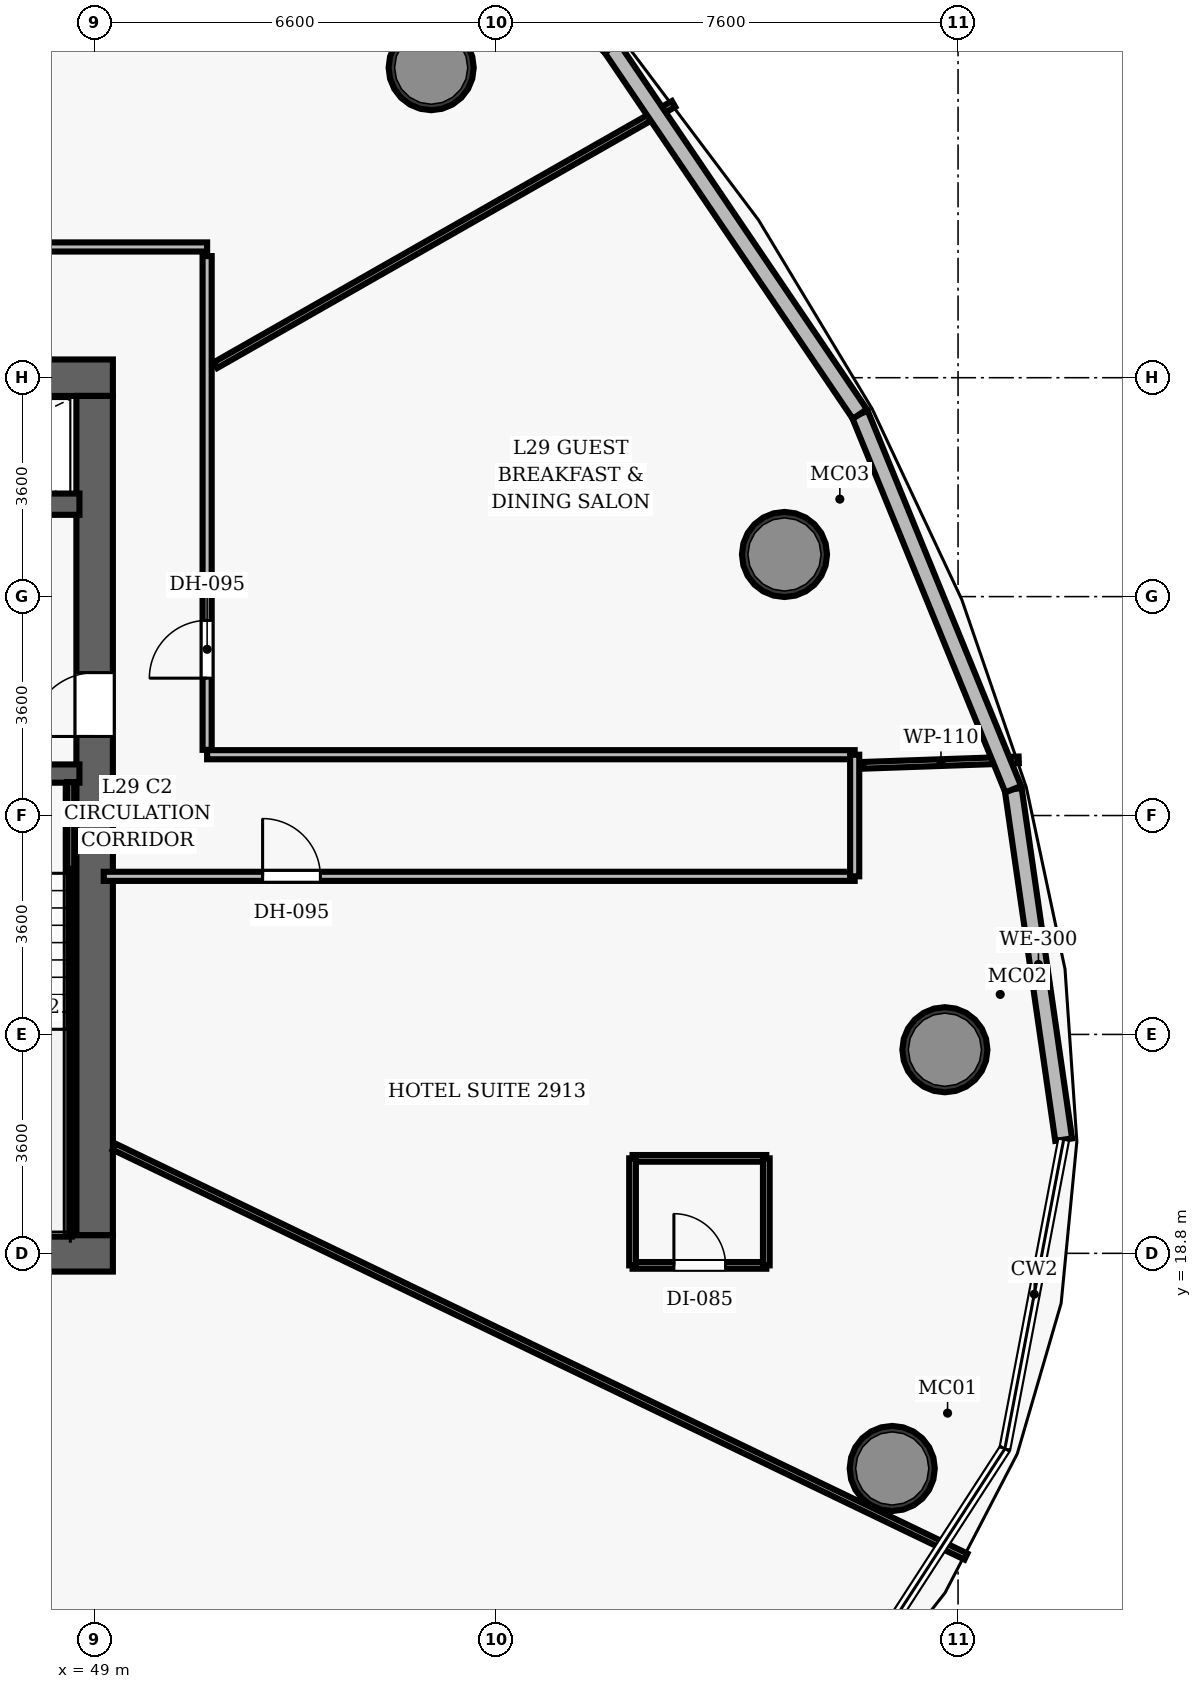
"""IFC4 building model, lengths in metres.
Left out: names, types, materials, properties, quantities, classifications, styles, units other than length and angle.
Written with IfcOpenShell. Run it as: python <this file> out.ifc"""

import sys

from ifc_helpers import new_model, si_unit, direction, frame, frame_2d, origin, origin_2d, place, context, subcontext, project, spatial, rectangle, hollow_circle, extrude, element, fill, save


model = new_model("IFC4")
c1 = context("Model", 3, precision=1e-05, world=origin(), true_north=direction((0.0, 1.0)))
c2 = subcontext(c1, "Body", "Model", "MODEL_VIEW")
j1 = project(units=[si_unit("LENGTHUNIT", "METRE"), si_unit("PLANEANGLEUNIT", "RADIAN")], contexts=[c1])
p1 = place(None, origin())
s1 = spatial("IfcSite", under=j1, at=p1, CompositionType="ELEMENT")
p2 = place(p1, origin())
s2 = spatial("IfcBuilding", under=s1, at=p2, CompositionType="ELEMENT")
p3 = place(p2, frame((0.0, 0.0, 120.3)))
s3 = spatial("IfcBuildingStorey", under=s2, at=p3, CompositionType="ELEMENT", Elevation=120.3)
p4 = place(p3, frame((26.7, 18.8, 0.0), z_axis=(0.0, 0.0, 1.0), x_axis=(1.0, 0.0, 0.0)))
e1 = element("IfcWall", 1, at=p4, inside=s3, PredefinedType="SHEAR", context=c2, shape_type="SweptSolid", body=[
    extrude(rectangle(XDim=22.6, YDim=0.6, at=frame_2d((11.3, 0.0))), origin(), (0.0, 0.0, 1.0), 3.5),
])
p5 = place(p4, frame((14.52, 0.0, 0.0)))
e2 = element("IfcOpeningElement", 2, at=p5, cuts=e1, PredefinedType="OPENING", context=c2, shape_type="SweptSolid", body=[
    extrude(rectangle(XDim=1.05, YDim=2.15, at=frame_2d((0.525, 1.075))), frame((0.0, 0.31, 0.0), z_axis=(0.0, -1.0, 0.0), x_axis=(1.0, 0.0, 0.0)), (0.0, 0.0, 1.0), 0.62),
])
p6 = place(p3, frame((26.7, 33.2, 0.0), z_axis=(0.0, 0.0, 1.0), x_axis=(1.0, 0.0, 0.0)))
e3 = element("IfcWall", 3, at=p6, inside=s3, PredefinedType="SHEAR", context=c2, shape_type="SweptSolid", body=[
    extrude(rectangle(XDim=22.6, YDim=0.6, at=frame_2d((11.3, 0.0))), origin(), (0.0, 0.0, 1.0), 3.5),
])
p7 = place(p6, frame((4.62, 0.0, 0.0)))
e4 = element("IfcOpeningElement", 4, at=p7, cuts=e3, PredefinedType="OPENING", context=c2, shape_type="SweptSolid", body=[
    extrude(rectangle(XDim=1.05, YDim=2.15, at=frame_2d((0.525, 1.075))), frame((0.0, 0.31, 0.0), z_axis=(0.0, -1.0, 0.0), x_axis=(1.0, 0.0, 0.0)), (0.0, 0.0, 1.0), 0.62),
])
p8 = place(p6, frame((14.52, 0.0, 0.0)))
e5 = element("IfcOpeningElement", 5, at=p8, cuts=e3, PredefinedType="OPENING", context=c2, shape_type="SweptSolid", body=[
    extrude(rectangle(XDim=1.05, YDim=2.15, at=frame_2d((0.525, 1.075))), frame((0.0, 0.31, 0.0), z_axis=(0.0, -1.0, 0.0), x_axis=(1.0, 0.0, 0.0)), (0.0, 0.0, 1.0), 0.62),
])
p9 = place(p3, frame((49.0, 19.1, 0.0), z_axis=(0.0, 0.0, 1.0), x_axis=(0.0, 1.0, 0.0)))
e6 = element("IfcWall", 6, at=p9, inside=s3, PredefinedType="SHEAR", context=c2, shape_type="SweptSolid", body=[
    extrude(rectangle(XDim=13.8, YDim=0.6, at=frame_2d((6.9, 0.0))), origin(), (0.0, 0.0, 1.0), 3.5),
])
p10 = place(p9, frame((8.2, 0.0, 0.0)))
e7 = element("IfcOpeningElement", 7, at=p10, cuts=e6, PredefinedType="OPENING", context=c2, shape_type="SweptSolid", body=[
    extrude(rectangle(XDim=1.05, YDim=2.15, at=frame_2d((0.525, 1.075))), frame((0.0, 0.31, 0.0), z_axis=(0.0, -1.0, 0.0), x_axis=(1.0, 0.0, 0.0)), (0.0, 0.0, 1.0), 0.62),
])
for number, where, z_axis, x_axis in (
    (8, (62.118, 15.262, 0.0), (0.0, 0.0, 1.0), (1.0, 0.0, 0.0)),
    (9, (62.984, 22.148, 0.0), (0.0, 0.0, 1.0), (1.0, 0.0, 0.0)),
    (10, (60.346, 30.293, 0.0), (0.0, 0.0, 1.0), (1.0, 0.0, 0.0)),
    (11, (54.535, 38.299, 0.0), (0.0, 0.0, 1.0), (1.0, 0.0, 0.0)),
):
    element("IfcColumn", number, at=place(p3, frame(where, z_axis=z_axis, x_axis=x_axis)), inside=s3, PredefinedType="COLUMN", context=c2, shape_type="SweptSolid", body=[
        extrude(hollow_circle(Radius=0.7, WallThickness=0.055, at=origin_2d()), origin(), (0.0, 0.0, 1.0), 3.5),
    ])
p11 = place(p3, frame((45.08, 26.69, 0.0), z_axis=(0.0, 0.0, 1.0), x_axis=(1.0, 0.0, 0.0)))
e12 = element("IfcWall", 12, at=p11, inside=s3, PredefinedType="SHEAR", context=c2, shape_type="SweptSolid", body=[
    extrude(rectangle(XDim=3.67, YDim=0.3, at=frame_2d((1.835, 0.0))), origin(), (0.0, 0.0, 1.0), 3.5),
])
p12 = place(p11, frame((1.05, 0.0, 0.0)))
e13 = element("IfcOpeningElement", 13, at=p12, cuts=e12, PredefinedType="OPENING", context=c2, shape_type="SweptSolid", body=[
    extrude(rectangle(XDim=1.1, YDim=2.15, at=frame_2d((0.55, 1.075))), frame((0.0, 0.16, 0.0), z_axis=(0.0, -1.0, 0.0), x_axis=(1.0, 0.0, 0.0)), (0.0, 0.0, 1.0), 0.32),
])
p13 = place(p3, frame((48.605, 19.1, 0.0), z_axis=(0.0, 0.0, 1.0), x_axis=(0.0, 1.0, 0.0)))
e14 = element("IfcWall", 14, at=p13, inside=s3, PredefinedType="SHEAR", context=c2, shape_type="SweptSolid", body=[
    extrude(rectangle(XDim=7.45, YDim=0.12, at=frame_2d((3.725, 0.0))), origin(), (0.0, 0.0, 1.0), 3.5),
])
p14 = place(p3, frame((45.51, 19.16, 0.0), z_axis=(0.0, 0.0, 1.0), x_axis=(1.0, 0.0, 0.0)))
e15 = element("IfcWall", 15, at=p14, inside=s3, PredefinedType="SHEAR", context=c2, shape_type="SweptSolid", body=[
    extrude(rectangle(XDim=3.095, YDim=0.12, at=frame_2d((1.547, 0.0))), origin(), (0.0, 0.0, 1.0), 3.5),
])
p15 = place(p3, frame((45.08, 31.12, 0.0), z_axis=(0.0, 0.0, 1.0), x_axis=(1.0, 0.0, 0.0)))
e16 = element("IfcWall", 16, at=p15, inside=s3, PredefinedType="SHEAR", context=c2, shape_type="SweptSolid", body=[
    extrude(rectangle(XDim=3.67, YDim=0.35, at=frame_2d((1.835, 0.0))), origin(), (0.0, 0.0, 1.0), 2.675),
])
p16 = place(p15, frame((1.25, 0.0, 0.0)))
e17 = element("IfcOpeningElement", 17, at=p16, cuts=e16, PredefinedType="OPENING", context=c2, shape_type="SweptSolid", body=[
    extrude(rectangle(XDim=1.1, YDim=2.15, at=frame_2d((0.55, 1.075))), frame((0.0, 0.185, 0.0), z_axis=(0.0, -1.0, 0.0), x_axis=(1.0, 0.0, 0.0)), (0.0, 0.0, 1.0), 0.37),
])
p17 = place(p3, frame((24.85, 35.35, 0.0), z_axis=(0.0, 0.0, 1.0), x_axis=(1.0, 0.0, 0.0)))
e18 = element("IfcWall", 18, at=p17, inside=s3, PredefinedType="PARTITIONING", context=c2, shape_type="SweptSolid", body=[
    extrude(rectangle(XDim=26.0, YDim=0.15, at=frame_2d((13.0, 0.0))), origin(), (0.0, 0.0, 1.0), 2.675),
])
p18 = place(p17, frame((20.21, 0.0, 0.0)))
e19 = element("IfcOpeningElement", 19, at=p18, cuts=e18, PredefinedType="OPENING", context=c2, shape_type="SweptSolid", body=[
    extrude(rectangle(XDim=0.95, YDim=2.15, at=frame_2d((0.475, 1.075))), frame((0.0, 0.085, 0.0), z_axis=(0.0, -1.0, 0.0), x_axis=(1.0, 0.0, 0.0)), (0.0, 0.0, 1.0), 0.17),
])
p19 = place(p17, frame((14.655, 0.0, 0.0)))
e20 = element("IfcOpeningElement", 20, at=p19, cuts=e18, PredefinedType="OPENING", context=c2, shape_type="SweptSolid", body=[
    extrude(rectangle(XDim=0.95, YDim=2.15, at=frame_2d((0.475, 1.075))), frame((0.0, 0.085, 0.0), z_axis=(0.0, -1.0, 0.0), x_axis=(1.0, 0.0, 0.0)), (0.0, 0.0, 1.0), 0.17),
])
p20 = place(p17, frame((12.441, 0.0, 0.0)))
e21 = element("IfcOpeningElement", 21, at=p20, cuts=e18, PredefinedType="OPENING", context=c2, shape_type="SweptSolid", body=[
    extrude(rectangle(XDim=0.95, YDim=2.15, at=frame_2d((0.475, 1.075))), frame((0.0, 0.085, 0.0), z_axis=(0.0, -1.0, 0.0), x_axis=(1.0, 0.0, 0.0)), (0.0, 0.0, 1.0), 0.17),
])
p21 = place(p17, frame((6.959, 0.0, 0.0)))
e22 = element("IfcOpeningElement", 22, at=p21, cuts=e18, PredefinedType="OPENING", context=c2, shape_type="SweptSolid", body=[
    extrude(rectangle(XDim=0.95, YDim=2.15, at=frame_2d((0.475, 1.075))), frame((0.0, 0.085, 0.0), z_axis=(0.0, -1.0, 0.0), x_axis=(1.0, 0.0, 0.0)), (0.0, 0.0, 1.0), 0.17),
])
p22 = place(p3, frame((50.85, 27.08, 0.0), z_axis=(0.0, 0.0, 1.0), x_axis=(0.0, 1.0, 0.0)))
e23 = element("IfcWall", 23, at=p22, inside=s3, PredefinedType="PARTITIONING", context=c2, shape_type="SweptSolid", body=[
    extrude(rectangle(XDim=8.12, YDim=0.15, at=frame_2d((4.06, 0.0))), origin(), (0.0, 0.0, 1.0), 2.675),
])
p23 = place(p22, frame((1.179, 0.0, 0.0)))
e24 = element("IfcOpeningElement", 24, at=p23, cuts=e23, PredefinedType="OPENING", context=c2, shape_type="SweptSolid", body=[
    extrude(rectangle(XDim=0.95, YDim=2.15, at=frame_2d((0.475, 1.075))), frame((0.0, 0.085, 0.0), z_axis=(0.0, -1.0, 0.0), x_axis=(1.0, 0.0, 0.0)), (0.0, 0.0, 1.0), 0.17),
])
p24 = place(p3, frame((50.85, 27.0, 0.0), z_axis=(0.0, 0.0, 1.0), x_axis=(1.0, 0.0, 0.0)))
e25 = element("IfcWall", 25, at=p24, inside=s3, PredefinedType="PARTITIONING", context=c2, shape_type="SweptSolid", body=[
    extrude(rectangle(XDim=10.65, YDim=0.15, at=frame_2d((5.325, 0.0))), origin(), (0.0, 0.0, 1.0), 2.675),
])
p25 = place(p3, frame((49.15, 25.0, 0.0), z_axis=(0.0, 0.0, 1.0), x_axis=(1.0, 0.0, 0.0)))
e26 = element("IfcWall", 26, at=p25, inside=s3, PredefinedType="PARTITIONING", context=c2, shape_type="SweptSolid", body=[
    extrude(rectangle(XDim=12.35, YDim=0.15, at=frame_2d((6.175, 0.0))), origin(), (0.0, 0.0, 1.0), 2.675),
])
p26 = place(p25, frame((2.613, 0.0, 0.0)))
e27 = element("IfcOpeningElement", 27, at=p26, cuts=e26, PredefinedType="OPENING", context=c2, shape_type="SweptSolid", body=[
    extrude(rectangle(XDim=0.95, YDim=2.15, at=frame_2d((0.475, 1.075))), frame((0.0, 0.085, 0.0), z_axis=(0.0, -1.0, 0.0), x_axis=(1.0, 0.0, 0.0)), (0.0, 0.0, 1.0), 0.17),
])
p27 = place(p3, frame((61.5, 25.0, 0.0), z_axis=(0.0, 0.0, 1.0), x_axis=(0.0, 1.0, 0.0)))
e28 = element("IfcWall", 28, at=p27, inside=s3, PredefinedType="PARTITIONING", context=c2, shape_type="SweptSolid", body=[
    extrude(rectangle(XDim=2.0, YDim=0.15, at=frame_2d((1.0, 0.0))), origin(), (0.0, 0.0, 1.0), 2.675),
])
p28 = place(p3, frame((61.64, 26.825, 0.0), z_axis=(0.0, 0.0, 1.0), x_axis=(0.999390493716, 0.03490903996, 0.0)))
e29 = element("IfcWall", 29, at=p28, inside=s3, PredefinedType="PARTITIONING", context=c2, shape_type="SweptSolid", body=[
    extrude(rectangle(XDim=2.56, YDim=0.11, at=frame_2d((1.28, 0.0))), origin(), (0.0, 0.0, 1.0), 2.675),
])
p29 = place(p3, frame((50.99, 33.407, 0.0), z_axis=(0.0, 0.0, 1.0), x_axis=(0.86869681336, 0.495344169703, 0.0)))
e30 = element("IfcWall", 30, at=p29, inside=s3, PredefinedType="PARTITIONING", context=c2, shape_type="SweptSolid", body=[
    extrude(rectangle(XDim=8.67, YDim=0.11, at=frame_2d((4.335, 0.0))), origin(), (0.0, 0.0, 1.0), 2.675),
])
p30 = place(p3, frame((44.073, 35.49, 0.0), z_axis=(0.0, 0.0, 1.0), x_axis=(0.538998120289, 0.842306966803, 0.0)))
e31 = element("IfcWall", 31, at=p30, inside=s3, PredefinedType="PARTITIONING", context=c2, shape_type="SweptSolid", body=[
    extrude(rectangle(XDim=11.593, YDim=0.11, at=frame_2d((5.797, 0.0))), origin(), (0.0, 0.0, 1.0), 2.675),
])
p31 = place(p3, frame((43.588, 18.48, 0.0), z_axis=(0.0, 0.0, 1.0), x_axis=(0.596448533395, -0.802651323434, 0.0)))
e32 = element("IfcWall", 32, at=p31, inside=s3, PredefinedType="PARTITIONING", context=c2, shape_type="SweptSolid", body=[
    extrude(rectangle(XDim=15.953, YDim=0.11, at=frame_2d((7.977, 0.0))), origin(), (0.0, 0.0, 1.0), 2.675),
])
p32 = place(p3, frame((49.32, 20.554, 0.0), z_axis=(0.0, 0.0, 1.0), x_axis=(0.901135756716, -0.433537020296, 0.0)))
e33 = element("IfcWall", 33, at=p32, inside=s3, PredefinedType="PARTITIONING", context=c2, shape_type="SweptSolid", body=[
    extrude(rectangle(XDim=15.547, YDim=0.11, at=frame_2d((7.773, 0.0))), origin(), (0.0, 0.0, 1.0), 2.675),
])
p33 = place(p3, frame((57.847, 18.602, 0.0), z_axis=(0.0, 0.0, 1.0), x_axis=(1.0, 0.0, 0.0)))
e34 = element("IfcWall", 34, at=p33, inside=s3, PredefinedType="PARTITIONING", context=c2, shape_type="SweptSolid", body=[
    extrude(rectangle(XDim=2.2, YDim=0.11, at=frame_2d((1.1, 0.0))), origin(), (0.0, 0.0, 1.0), 2.675),
])
p34 = place(p33, frame((0.68, 0.0, 0.0)))
e35 = element("IfcOpeningElement", 35, at=p34, cuts=e34, PredefinedType="OPENING", context=c2, shape_type="SweptSolid", body=[
    extrude(rectangle(XDim=0.85, YDim=2.1, at=frame_2d((0.425, 1.05))), frame((0.0, 0.065, 0.0), z_axis=(0.0, -1.0, 0.0), x_axis=(1.0, 0.0, 0.0)), (0.0, 0.0, 1.0), 0.13),
])
p35 = place(p3, frame((57.847, 20.362, 0.0), z_axis=(0.0, 0.0, 1.0), x_axis=(1.0, 0.0, 0.0)))
e36 = element("IfcWall", 36, at=p35, inside=s3, PredefinedType="PARTITIONING", context=c2, shape_type="SweptSolid", body=[
    extrude(rectangle(XDim=2.2, YDim=0.11, at=frame_2d((1.1, 0.0))), origin(), (0.0, 0.0, 1.0), 2.675),
])
for number, where, z_axis, x_axis in (
    (37, (57.847, 18.602, 0.0), (0.0, 0.0, 1.0), (0.0, 1.0, 0.0)),
    (38, (60.047, 18.602, 0.0), (0.0, 0.0, 1.0), (0.0, 1.0, 0.0)),
):
    element("IfcWall", number, at=place(p3, frame(where, z_axis=z_axis, x_axis=x_axis)), inside=s3, PredefinedType="PARTITIONING", context=c2, shape_type="SweptSolid", body=[
        extrude(rectangle(XDim=1.76, YDim=0.11, at=frame_2d((0.88, 0.0))), origin(), (0.0, 0.0, 1.0), 2.675),
    ])
p36 = place(p3, frame((64.107, 26.433, 0.0), z_axis=(0.0, 0.0, 1.0), x_axis=(0.142471997075, -0.989798833122, 0.0)))
e39 = element("IfcWall", 39, at=p36, inside=s3, PredefinedType="SOLIDWALL", context=c2, shape_type="SweptSolid", body=[
    extrude(rectangle(XDim=5.823, YDim=0.28, at=frame_2d((2.911, 0.0))), origin(), (0.0, 0.0, 1.0), 3.26),
])
p37 = place(p3, frame((61.585, 32.602, 0.0), z_axis=(0.0, 0.0, 1.0), x_axis=(0.378465960246, -0.925615209974, 0.0)))
e40 = element("IfcWall", 40, at=p37, inside=s3, PredefinedType="SOLIDWALL", context=c2, shape_type="SweptSolid", body=[
    extrude(rectangle(XDim=6.665, YDim=0.28, at=frame_2d((3.333, 0.0))), origin(), (0.0, 0.0, 1.0), 3.26),
])
p38 = place(p3, frame((57.494, 38.639, 0.0), z_axis=(0.0, 0.0, 1.0), x_axis=(0.56098139496, -0.827828408856, 0.0)))
e41 = element("IfcWall", 41, at=p38, inside=s3, PredefinedType="SOLIDWALL", context=c2, shape_type="SweptSolid", body=[
    extrude(rectangle(XDim=7.292, YDim=0.28, at=frame_2d((3.646, 0.0))), origin(), (0.0, 0.0, 1.0), 3.26),
])
p39 = place(p3, frame((51.999, 43.844, 0.0), z_axis=(0.0, 0.0, 1.0), x_axis=(0.725990823491, -0.687704387224, 0.0)))
e42 = element("IfcWall", 42, at=p39, inside=s3, PredefinedType="SOLIDWALL", context=c2, shape_type="SweptSolid", body=[
    extrude(rectangle(XDim=7.569, YDim=0.28, at=frame_2d((3.785, 0.0))), origin(), (0.0, 0.0, 1.0), 3.26),
])
p40 = place(p10, origin())
e43 = element("IfcDoor", 43, at=p40, inside=s3, OperationType="SINGLE_SWING_LEFT", PredefinedType="DOOR", context=c2, shape_type="SweptSolid", body=[
    extrude(rectangle(XDim=1.05, YDim=2.15, at=frame_2d((0.525, 1.075))), frame((0.0, 0.025, 0.0), z_axis=(0.0, -1.0, 0.0), x_axis=(1.0, 0.0, 0.0)), (0.0, 0.0, 1.0), 0.05),
])
fill(e7, e43)
p41 = place(p23, origin())
e44 = element("IfcDoor", 44, at=p41, inside=s3, OperationType="SINGLE_SWING_LEFT", PredefinedType="DOOR", context=c2, shape_type="SweptSolid", body=[
    extrude(rectangle(XDim=0.95, YDim=2.15, at=frame_2d((0.475, 1.075))), frame((0.0, 0.025, 0.0), z_axis=(0.0, -1.0, 0.0), x_axis=(1.0, 0.0, 0.0)), (0.0, 0.0, 1.0), 0.05),
])
fill(e24, e44)
p42 = place(p26, origin())
e45 = element("IfcDoor", 45, at=p42, inside=s3, OperationType="SINGLE_SWING_LEFT", PredefinedType="DOOR", context=c2, shape_type="SweptSolid", body=[
    extrude(rectangle(XDim=0.95, YDim=2.15, at=frame_2d((0.475, 1.075))), frame((0.0, 0.025, 0.0), z_axis=(0.0, -1.0, 0.0), x_axis=(1.0, 0.0, 0.0)), (0.0, 0.0, 1.0), 0.05),
])
fill(e27, e45)
p43 = place(p34, origin())
e46 = element("IfcDoor", 46, at=p43, inside=s3, OperationType="SINGLE_SWING_LEFT", PredefinedType="DOOR", context=c2, shape_type="SweptSolid", body=[
    extrude(rectangle(XDim=0.85, YDim=2.1, at=frame_2d((0.425, 1.05))), frame((0.0, 0.025, 0.0), z_axis=(0.0, -1.0, 0.0), x_axis=(1.0, 0.0, 0.0)), (0.0, 0.0, 1.0), 0.05),
])
fill(e35, e46)
save(model, sys.argv[1])
